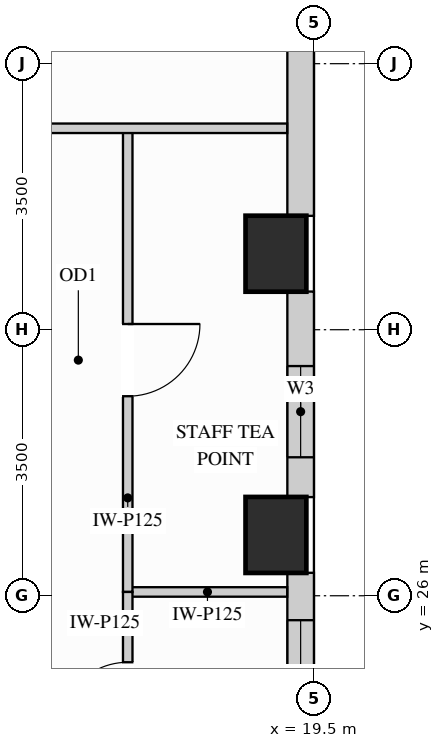
"""IFC4 building model, lengths in metres.
Left out: names, types, materials, properties, quantities, classifications, styles, units other than length and angle.
Written with IfcOpenShell. Run it as: python <this file> out.ifc"""

import sys

from ifc_helpers import new_model, si_unit, direction, frame, frame_2d, origin, origin_2d, place, context, subcontext, project, spatial, rectangle, extrude, source, transform, mapped, element, fill, save


model = new_model("IFC4")
c1 = context("Model", 3, precision=1e-05, world=origin(), true_north=direction((0.0, 1.0)))
c2 = subcontext(c1, "Body", "Model", "MODEL_VIEW")
j1 = project(units=[si_unit("LENGTHUNIT", "METRE"), si_unit("PLANEANGLEUNIT", "RADIAN")], contexts=[c1])
p1 = place(None, origin())
s1 = spatial("IfcSite", under=j1, at=p1, CompositionType="ELEMENT")
p2 = place(p1, origin())
s2 = spatial("IfcBuilding", under=s1, at=p2, CompositionType="ELEMENT")
p3 = place(p2, frame((0.0, 0.0, 164.7)))
s3 = spatial("IfcBuildingStorey", under=s2, at=p3, CompositionType="ELEMENT", Elevation=164.7)
m1 = source(origin(), c2, "Body", "SweptSolid", [
    extrude(rectangle(XDim=0.8, YDim=1.0, at=origin_2d()), origin(), (0.0, 0.0, 1.0), 3.4),
])
for number, where, z_axis, x_axis in (
    (1, (19.0, 26.8, 0.0), (0.0, 0.0, 1.0), (1.0, 0.0, 0.0)),
    (2, (19.0, 30.5, 0.0), (0.0, 0.0, 1.0), (1.0, 0.0, 0.0)),
):
    element("IfcColumn", number, at=place(p3, frame(where, z_axis=z_axis, x_axis=x_axis)), inside=s3, PredefinedType="COLUMN", context=c2, shape_type="MappedRepresentation", body=[
        mapped(m1, transform((0.0, 0.0, 0.0), x_axis=(1.0, 0.0, 0.0), y_axis=(0.0, 1.0, 0.0), z_axis=(0.0, 0.0, 1.0))),
    ])
p4 = place(p3, frame((19.325, 22.998, 0.0), z_axis=(0.0, 0.0, 1.0), x_axis=(0.0, 1.0, 0.0)))
e3 = element("IfcWall", 3, at=p4, inside=s3, PredefinedType="SOLIDWALL", context=c2, shape_type="SweptSolid", body=[
    extrude(rectangle(XDim=3.304, YDim=0.35, at=frame_2d((1.652, 0.0))), origin(), (0.0, 0.0, 1.0), 2.612),
])
p5 = place(p4, frame((1.18, 0.0, 0.78)))
e4 = element("IfcOpeningElement", 4, at=p5, cuts=e3, PredefinedType="OPENING", context=c2, shape_type="SweptSolid", body=[
    extrude(rectangle(XDim=1.5, YDim=1.652, at=frame_2d((0.75, 0.826))), frame((0.0, 0.185, 0.0), z_axis=(0.0, -1.0, 0.0), x_axis=(1.0, 0.0, 0.0)), (0.0, 0.0, 1.0), 0.37),
])
p6 = place(p3, frame((19.325, 27.298, 0.0), z_axis=(0.0, 0.0, 1.0), x_axis=(0.0, 1.0, 0.0)))
e5 = element("IfcWall", 5, at=p6, inside=s3, PredefinedType="SOLIDWALL", context=c2, shape_type="SweptSolid", body=[
    extrude(rectangle(XDim=2.704, YDim=0.35, at=frame_2d((1.352, 0.0))), origin(), (0.0, 0.0, 1.0), 2.612),
])
p7 = place(p6, frame((0.524, 0.0, 0.78)))
e6 = element("IfcOpeningElement", 6, at=p7, cuts=e5, PredefinedType="OPENING", context=c2, shape_type="SweptSolid", body=[
    extrude(rectangle(XDim=1.2, YDim=1.652, at=frame_2d((0.6, 0.826))), frame((0.0, 0.185, 0.0), z_axis=(0.0, -1.0, 0.0), x_axis=(1.0, 0.0, 0.0)), (0.0, 0.0, 1.0), 0.37),
])
m2 = source(origin(), c2, "Body", "SweptSolid", [
    extrude(rectangle(XDim=3.504, YDim=0.35, at=frame_2d((1.752, 0.0))), origin(), (0.0, 0.0, 1.0), 2.612),
])
p8 = place(p3, frame((19.325, 30.998, 0.0), z_axis=(0.0, 0.0, 1.0), x_axis=(0.0, 1.0, 0.0)))
e7 = element("IfcWall", 7, at=p8, inside=s3, PredefinedType="SOLIDWALL", context=c2, shape_type="MappedRepresentation", body=[
    mapped(m2, transform((0.0, 0.0, 0.0), x_axis=(1.0, 0.0, 0.0), y_axis=(0.0, 1.0, 0.0), z_axis=(0.0, 0.0, 1.0))),
])
m3 = source(origin(), c2, "Body", "SweptSolid", [
    extrude(rectangle(XDim=2.098, YDim=0.125, at=frame_2d((1.049, 0.0))), origin(), (0.0, 0.0, 1.0), 3.385),
])
p9 = place(p3, frame((17.05, 26.05, 0.0), z_axis=(0.0, 0.0, 1.0), x_axis=(1.0, 0.0, 0.0)))
e8 = element("IfcWall", 8, at=p9, inside=s3, PredefinedType="PARTITIONING", context=c2, shape_type="MappedRepresentation", body=[
    mapped(m3, transform((0.0, 0.0, 0.0), x_axis=(1.0, 0.0, 0.0), y_axis=(0.0, 1.0, 0.0), z_axis=(0.0, 0.0, 1.0))),
])
p10 = place(p3, frame((17.05, 26.05, 0.0), z_axis=(0.0, 0.0, 1.0), x_axis=(0.0, 1.0, 0.0)))
e9 = element("IfcWall", 9, at=p10, inside=s3, PredefinedType="PARTITIONING", context=c2, shape_type="SweptSolid", body=[
    extrude(rectangle(XDim=6.1, YDim=0.125, at=frame_2d((3.05, 0.0))), origin(), (0.0, 0.0, 1.0), 3.385),
])
p11 = place(p10, frame((2.575, 0.0, 0.0)))
e10 = element("IfcOpeningElement", 10, at=p11, cuts=e9, PredefinedType="OPENING", context=c2, shape_type="SweptSolid", body=[
    extrude(rectangle(XDim=0.95, YDim=2.15, at=frame_2d((0.475, 1.075))), frame((0.0, 0.073, 0.0), z_axis=(0.0, -1.0, 0.0), x_axis=(1.0, 0.0, 0.0)), (0.0, 0.0, 1.0), 0.145),
])
p12 = place(p3, frame((17.05, 23.35, 0.0), z_axis=(0.0, 0.0, 1.0), x_axis=(0.0, 1.0, 0.0)))
e11 = element("IfcWall", 11, at=p12, inside=s3, PredefinedType="PARTITIONING", context=c2, shape_type="SweptSolid", body=[
    extrude(rectangle(XDim=2.7, YDim=0.125, at=frame_2d((1.35, 0.0))), origin(), (0.0, 0.0, 1.0), 3.385),
])
p13 = place(p12, frame((0.875, 0.0, 0.0)))
e12 = element("IfcOpeningElement", 12, at=p13, cuts=e11, PredefinedType="OPENING", context=c2, shape_type="SweptSolid", body=[
    extrude(rectangle(XDim=0.9, YDim=2.15, at=frame_2d((0.45, 1.075))), frame((0.0, 0.073, 0.0), z_axis=(0.0, -1.0, 0.0), x_axis=(1.0, 0.0, 0.0)), (0.0, 0.0, 1.0), 0.145),
])
m4 = source(origin(), c2, "Body", "SweptSolid", [
    extrude(rectangle(XDim=7.498, YDim=0.125, at=frame_2d((3.749, 0.0))), origin(), (0.0, 0.0, 1.0), 3.385),
])
p14 = place(p3, frame((11.65, 32.15, 0.0), z_axis=(0.0, 0.0, 1.0), x_axis=(1.0, 0.0, 0.0)))
e13 = element("IfcWall", 13, at=p14, inside=s3, PredefinedType="PARTITIONING", context=c2, shape_type="MappedRepresentation", body=[
    mapped(m4, transform((0.0, 0.0, 0.0), x_axis=(1.0, 0.0, 0.0), y_axis=(0.0, 1.0, 0.0), z_axis=(0.0, 0.0, 1.0))),
])
m5 = source(origin(), c2, "Body", "SweptSolid", [
    extrude(rectangle(XDim=0.95, YDim=2.15, at=frame_2d((0.475, 1.075))), frame((0.0, 0.025, 0.0), z_axis=(0.0, -1.0, 0.0), x_axis=(1.0, 0.0, 0.0)), (0.0, 0.0, 1.0), 0.05),
])
p15 = place(p11, origin())
e14 = element("IfcDoor", 14, at=p15, inside=s3, OperationType="SINGLE_SWING_RIGHT", PredefinedType="DOOR", context=c2, shape_type="MappedRepresentation", body=[
    mapped(m5, transform((0.0, 0.0, 0.0), x_axis=(1.0, 0.0, 0.0), y_axis=(0.0, 1.0, 0.0), z_axis=(0.0, 0.0, 1.0))),
])
fill(e10, e14)
m6 = source(origin(), c2, "Body", "SweptSolid", [
    extrude(rectangle(XDim=0.9, YDim=2.15, at=frame_2d((0.45, 1.075))), frame((0.0, 0.025, 0.0), z_axis=(0.0, -1.0, 0.0), x_axis=(1.0, 0.0, 0.0)), (0.0, 0.0, 1.0), 0.05),
])
p16 = place(p13, origin())
e15 = element("IfcDoor", 15, at=p16, inside=s3, OperationType="SINGLE_SWING_LEFT", PredefinedType="DOOR", context=c2, shape_type="MappedRepresentation", body=[
    mapped(m6, transform((0.0, 0.0, 0.0), x_axis=(1.0, 0.0, 0.0), y_axis=(0.0, 1.0, 0.0), z_axis=(0.0, 0.0, 1.0))),
])
fill(e12, e15)
m7 = source(origin(), c2, "Body", "SweptSolid", [
    extrude(rectangle(XDim=1.2, YDim=1.652, at=frame_2d((0.6, 0.826))), frame((0.0, 0.03, 0.0), z_axis=(0.0, -1.0, 0.0), x_axis=(1.0, 0.0, 0.0)), (0.0, 0.0, 1.0), 0.06),
])
p17 = place(p7, origin())
e16 = element("IfcWindow", 16, at=p17, inside=s3, PartitioningType="SINGLE_PANEL", PredefinedType="WINDOW", context=c2, shape_type="MappedRepresentation", body=[
    mapped(m7, transform((0.0, 0.0, 0.0), x_axis=(1.0, 0.0, 0.0), y_axis=(0.0, 1.0, 0.0), z_axis=(0.0, 0.0, 1.0))),
])
fill(e6, e16)
m8 = source(origin(), c2, "Body", "SweptSolid", [
    extrude(rectangle(XDim=1.5, YDim=1.652, at=frame_2d((0.75, 0.826))), frame((0.0, 0.03, 0.0), z_axis=(0.0, -1.0, 0.0), x_axis=(1.0, 0.0, 0.0)), (0.0, 0.0, 1.0), 0.06),
])
p18 = place(p5, origin())
e17 = element("IfcWindow", 17, at=p18, inside=s3, PartitioningType="SINGLE_PANEL", PredefinedType="WINDOW", context=c2, shape_type="MappedRepresentation", body=[
    mapped(m8, transform((0.0, 0.0, 0.0), x_axis=(1.0, 0.0, 0.0), y_axis=(0.0, 1.0, 0.0), z_axis=(0.0, 0.0, 1.0))),
])
fill(e4, e17)
save(model, sys.argv[1])
